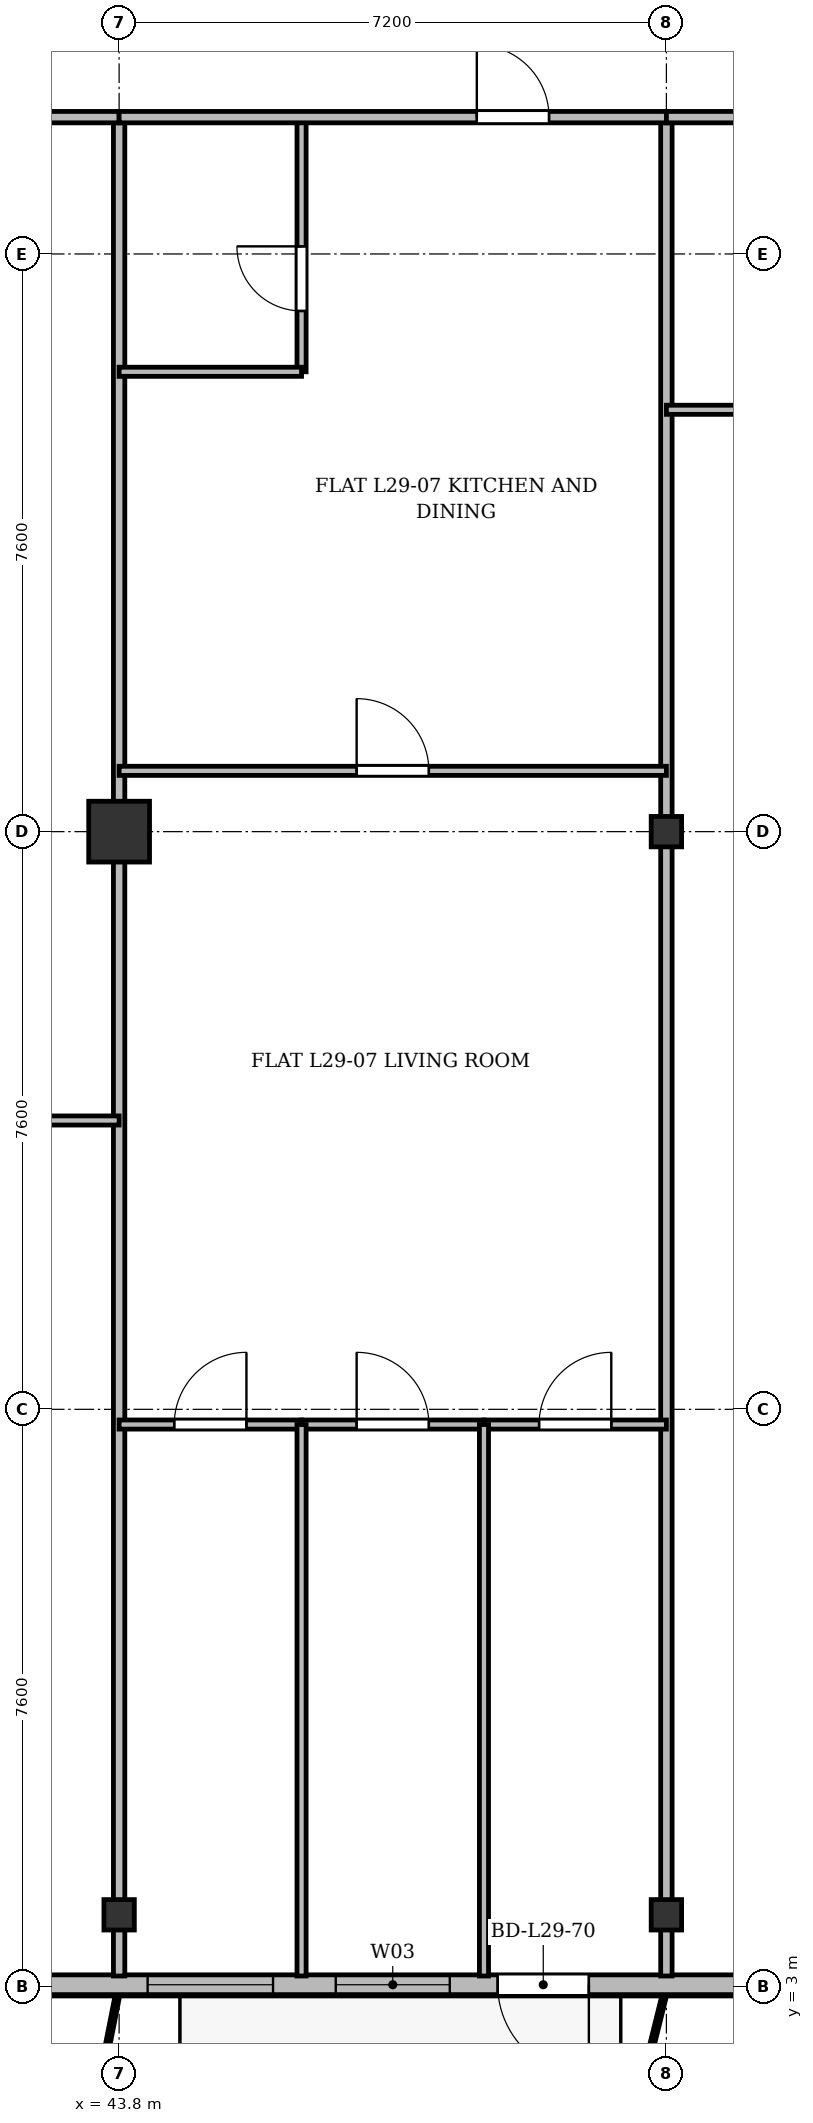
"""IFC4 building model, lengths in metres.
Left out: names, types, materials, properties, quantities, classifications, styles, units other than length and angle.
Written with IfcOpenShell. Run it as: python <this file> out.ifc"""

import sys

from ifc_helpers import new_model, si_unit, direction, frame, frame_2d, origin, origin_2d, place, context, subcontext, project, spatial, rectangle, i_section, extrude, source, transform, mapped, element, fill, save


model = new_model("IFC4")
c1 = context("Model", 3, precision=1e-05, world=origin(), true_north=direction((0.0, 1.0)))
c2 = subcontext(c1, "Body", "Model", "MODEL_VIEW")
j1 = project(units=[si_unit("LENGTHUNIT", "METRE"), si_unit("PLANEANGLEUNIT", "RADIAN")], contexts=[c1])
p1 = place(None, origin())
s1 = spatial("IfcSite", under=j1, at=p1, CompositionType="ELEMENT")
p2 = place(p1, origin())
s2 = spatial("IfcBuilding", under=s1, at=p2, CompositionType="ELEMENT")
p3 = place(p2, frame((0.0, 0.0, 114.1)))
s3 = spatial("IfcBuildingStorey", under=s2, at=p3, CompositionType="ELEMENT", Elevation=114.1)
m1 = source(origin(), c2, "Body", "SweptSolid", [
    extrude(i_section(OverallWidth=0.4, OverallDepth=0.4, WebThickness=0.022, FlangeThickness=0.035, at=origin_2d()), origin(), (0.0, 0.0, 1.0), 3.6),
])
p4 = place(p3, frame((43.8, 3.95, 0.0), z_axis=(0.0, 0.0, 1.0), x_axis=(1.0, 0.0, 0.0)))
e1 = element("IfcColumn", 1, at=p4, inside=s3, PredefinedType="COLUMN", context=c2, shape_type="MappedRepresentation", body=[
    mapped(m1, transform((0.0, 0.0, 0.0), x_axis=(1.0, 0.0, 0.0), y_axis=(0.0, 1.0, 0.0), z_axis=(0.0, 0.0, 1.0), scale=1.0)),
])
m2 = source(origin(), c2, "Body", "SweptSolid", [
    extrude(rectangle(XDim=0.8, YDim=0.8, at=origin_2d()), origin(), (0.0, 0.0, 1.0), 3.6),
])
p5 = place(p3, frame((43.8, 18.2, 0.0), z_axis=(0.0, 0.0, 1.0), x_axis=(1.0, 0.0, 0.0)))
e2 = element("IfcColumn", 2, at=p5, inside=s3, PredefinedType="COLUMN", context=c2, shape_type="MappedRepresentation", body=[
    mapped(m2, transform((0.0, 0.0, 0.0), x_axis=(1.0, 0.0, 0.0), y_axis=(0.0, 1.0, 0.0), z_axis=(0.0, 0.0, 1.0), scale=1.0)),
])
for number, where, z_axis, x_axis in (
    (3, (51.0, 3.95, 0.0), (0.0, 0.0, 1.0), (1.0, 0.0, 0.0)),
    (4, (51.0, 18.2, 0.0), (0.0, 0.0, 1.0), (1.0, 0.0, 0.0)),
):
    element("IfcColumn", number, at=place(p3, frame(where, z_axis=z_axis, x_axis=x_axis)), inside=s3, PredefinedType="COLUMN", context=c2, shape_type="MappedRepresentation", body=[
        mapped(m1, transform((0.0, 0.0, 0.0), x_axis=(1.0, 0.0, 0.0), y_axis=(0.0, 1.0, 0.0), z_axis=(0.0, 0.0, 1.0), scale=1.0)),
    ])
p6 = place(p3, frame((66.9, 3.03, 0.0), z_axis=(0.0, 0.0, 1.0), x_axis=(-1.0, 0.0, 0.0)))
e5 = element("IfcWall", 5, at=p6, inside=s3, PredefinedType="SOLIDWALL", context=c2, shape_type="SweptSolid", body=[
    extrude(rectangle(XDim=59.4, YDim=0.26, at=frame_2d((29.7, 0.0))), origin(), (0.0, 0.0, 1.0), 3.34),
])
p7 = place(p6, frame((0.47, 0.0, 0.9)))
e6 = element("IfcOpeningElement", 6, at=p7, cuts=e5, PredefinedType="OPENING", context=c2, shape_type="SweptSolid", body=[
    extrude(rectangle(XDim=1.65, YDim=1.85, at=frame_2d((0.825, 0.925))), frame((0.0, 0.14, 0.0), z_axis=(0.0, -1.0, 0.0), x_axis=(1.0, 0.0, 0.0)), (0.0, 0.0, 1.0), 0.28),
])
p8 = place(p6, frame((4.4, 0.0, 0.9)))
e7 = element("IfcOpeningElement", 7, at=p8, cuts=e5, PredefinedType="OPENING", context=c2, shape_type="SweptSolid", body=[
    extrude(rectangle(XDim=1.8, YDim=1.8, at=frame_2d((0.9, 0.9))), frame((0.0, 0.14, 0.0), z_axis=(0.0, -1.0, 0.0), x_axis=(1.0, 0.0, 0.0)), (0.0, 0.0, 1.0), 0.28),
])
p9 = place(p6, frame((10.9, 0.0, 0.9)))
e8 = element("IfcOpeningElement", 8, at=p9, cuts=e5, PredefinedType="OPENING", context=c2, shape_type="SweptSolid", body=[
    extrude(rectangle(XDim=2.2, YDim=1.8, at=frame_2d((1.1, 0.9))), frame((0.0, 0.14, 0.0), z_axis=(0.0, -1.0, 0.0), x_axis=(1.0, 0.0, 0.0)), (0.0, 0.0, 1.0), 0.28),
])
p10 = place(p6, frame((16.92, 0.0, 0.0)))
e9 = element("IfcOpeningElement", 9, at=p10, cuts=e5, PredefinedType="OPENING", context=c2, shape_type="SweptSolid", body=[
    extrude(rectangle(XDim=1.2, YDim=2.2, at=frame_2d((0.6, 1.1))), frame((0.0, 0.14, 0.0), z_axis=(0.0, -1.0, 0.0), x_axis=(1.0, 0.0, 0.0)), (0.0, 0.0, 1.0), 0.28),
])
p11 = place(p6, frame((18.75, 0.0, 0.9)))
e10 = element("IfcOpeningElement", 10, at=p11, cuts=e5, PredefinedType="OPENING", context=c2, shape_type="SweptSolid", body=[
    extrude(rectangle(XDim=1.5, YDim=1.75, at=frame_2d((0.75, 0.875))), frame((0.0, 0.14, 0.0), z_axis=(0.0, -1.0, 0.0), x_axis=(1.0, 0.0, 0.0)), (0.0, 0.0, 1.0), 0.28),
])
p12 = place(p6, frame((21.075, 0.0, 0.9)))
e11 = element("IfcOpeningElement", 11, at=p12, cuts=e5, PredefinedType="OPENING", context=c2, shape_type="SweptSolid", body=[
    extrude(rectangle(XDim=1.65, YDim=1.85, at=frame_2d((0.825, 0.925))), frame((0.0, 0.14, 0.0), z_axis=(0.0, -1.0, 0.0), x_axis=(1.0, 0.0, 0.0)), (0.0, 0.0, 1.0), 0.28),
])
p13 = place(p6, frame((26.5, 0.0, 0.9)))
e12 = element("IfcOpeningElement", 12, at=p13, cuts=e5, PredefinedType="OPENING", context=c2, shape_type="SweptSolid", body=[
    extrude(rectangle(XDim=1.8, YDim=1.8, at=frame_2d((0.9, 0.9))), frame((0.0, 0.14, 0.0), z_axis=(0.0, -1.0, 0.0), x_axis=(1.0, 0.0, 0.0)), (0.0, 0.0, 1.0), 0.28),
])
p14 = place(p6, frame((32.45, 0.0, 0.9)))
e13 = element("IfcOpeningElement", 13, at=p14, cuts=e5, PredefinedType="OPENING", context=c2, shape_type="SweptSolid", body=[
    extrude(rectangle(XDim=2.2, YDim=1.8, at=frame_2d((1.1, 0.9))), frame((0.0, 0.14, 0.0), z_axis=(0.0, -1.0, 0.0), x_axis=(1.0, 0.0, 0.0)), (0.0, 0.0, 1.0), 0.28),
])
p15 = place(p6, frame((36.5, 0.0, 0.9)))
e14 = element("IfcOpeningElement", 14, at=p15, cuts=e5, PredefinedType="OPENING", context=c2, shape_type="SweptSolid", body=[
    extrude(rectangle(XDim=1.5, YDim=1.75, at=frame_2d((0.75, 0.875))), frame((0.0, 0.14, 0.0), z_axis=(0.0, -1.0, 0.0), x_axis=(1.0, 0.0, 0.0)), (0.0, 0.0, 1.0), 0.28),
])
p16 = place(p6, frame((39.6, 0.0, 0.9)))
e15 = element("IfcOpeningElement", 15, at=p16, cuts=e5, PredefinedType="OPENING", context=c2, shape_type="SweptSolid", body=[
    extrude(rectangle(XDim=2.0, YDim=1.95, at=frame_2d((1.0, 0.975))), frame((0.0, 0.14, 0.0), z_axis=(0.0, -1.0, 0.0), x_axis=(1.0, 0.0, 0.0)), (0.0, 0.0, 1.0), 0.28),
])
p17 = place(p6, frame((42.775, 0.0, 0.9)))
e16 = element("IfcOpeningElement", 16, at=p17, cuts=e5, PredefinedType="OPENING", context=c2, shape_type="SweptSolid", body=[
    extrude(rectangle(XDim=1.65, YDim=1.85, at=frame_2d((0.825, 0.925))), frame((0.0, 0.14, 0.0), z_axis=(0.0, -1.0, 0.0), x_axis=(1.0, 0.0, 0.0)), (0.0, 0.0, 1.0), 0.28),
])
p18 = place(p6, frame((46.435, 0.0, 0.0)))
e17 = element("IfcOpeningElement", 17, at=p18, cuts=e5, PredefinedType="OPENING", context=c2, shape_type="SweptSolid", body=[
    extrude(rectangle(XDim=1.2, YDim=2.2, at=frame_2d((0.6, 1.1))), frame((0.0, 0.14, 0.0), z_axis=(0.0, -1.0, 0.0), x_axis=(1.0, 0.0, 0.0)), (0.0, 0.0, 1.0), 0.28),
])
p19 = place(p6, frame((48.65, 0.0, 0.9)))
e18 = element("IfcOpeningElement", 18, at=p19, cuts=e5, PredefinedType="OPENING", context=c2, shape_type="SweptSolid", body=[
    extrude(rectangle(XDim=2.2, YDim=1.8, at=frame_2d((1.1, 0.9))), frame((0.0, 0.14, 0.0), z_axis=(0.0, -1.0, 0.0), x_axis=(1.0, 0.0, 0.0)), (0.0, 0.0, 1.0), 0.28),
])
p20 = place(p6, frame((53.25, 0.0, 0.9)))
e19 = element("IfcOpeningElement", 19, at=p20, cuts=e5, PredefinedType="OPENING", context=c2, shape_type="SweptSolid", body=[
    extrude(rectangle(XDim=1.5, YDim=1.75, at=frame_2d((0.75, 0.875))), frame((0.0, 0.14, 0.0), z_axis=(0.0, -1.0, 0.0), x_axis=(1.0, 0.0, 0.0)), (0.0, 0.0, 1.0), 0.28),
])
p21 = place(p6, frame((57.005, 0.0, 0.9)))
e20 = element("IfcOpeningElement", 20, at=p21, cuts=e5, PredefinedType="OPENING", context=c2, shape_type="SweptSolid", body=[
    extrude(rectangle(XDim=2.0, YDim=1.95, at=frame_2d((1.0, 0.975))), frame((0.0, 0.14, 0.0), z_axis=(0.0, -1.0, 0.0), x_axis=(1.0, 0.0, 0.0)), (0.0, 0.0, 1.0), 0.28),
])
for number, where, z_axis, x_axis in (
    (21, (43.8, 3.145, 0.0), (0.0, 0.0, 1.0), (0.0, 1.0, 0.0)),
    (22, (51.0, 3.145, 0.0), (0.0, 0.0, 1.0), (0.0, 1.0, 0.0)),
):
    element("IfcWall", number, at=place(p3, frame(where, z_axis=z_axis, x_axis=x_axis)), inside=s3, PredefinedType="PARTITIONING", context=c2, shape_type="SweptSolid", body=[
        extrude(rectangle(XDim=24.455, YDim=0.15, at=frame_2d((12.228, 0.0))), origin(), (0.0, 0.0, 1.0), 2.84),
    ])
p22 = place(p3, frame((35.2, 27.6, 0.0), z_axis=(0.0, 0.0, 1.0), x_axis=(1.0, 0.0, 0.0)))
e23 = element("IfcWall", 23, at=p22, inside=s3, PredefinedType="PARTITIONING", context=c2, shape_type="SweptSolid", body=[
    extrude(rectangle(XDim=8.6, YDim=0.15, at=frame_2d((4.3, 0.0))), origin(), (0.0, 0.0, 1.0), 2.84),
])
p23 = place(p22, frame((3.825, 0.0, 0.0)))
e24 = element("IfcOpeningElement", 24, at=p23, cuts=e23, PredefinedType="OPENING", context=c2, shape_type="SweptSolid", body=[
    extrude(rectangle(XDim=0.95, YDim=2.15, at=frame_2d((0.475, 1.075))), frame((0.0, 0.085, 0.0), z_axis=(0.0, -1.0, 0.0), x_axis=(1.0, 0.0, 0.0)), (0.0, 0.0, 1.0), 0.17),
])
p24 = place(p3, frame((35.2, 14.4, 0.0), z_axis=(0.0, 0.0, 1.0), x_axis=(1.0, 0.0, 0.0)))
e25 = element("IfcWall", 25, at=p24, inside=s3, PredefinedType="PARTITIONING", context=c2, shape_type="SweptSolid", body=[
    extrude(rectangle(XDim=8.6, YDim=0.12, at=frame_2d((4.3, 0.0))), origin(), (0.0, 0.0, 1.0), 2.84),
])
p25 = place(p24, frame((3.825, 0.0, 0.0)))
e26 = element("IfcOpeningElement", 26, at=p25, cuts=e25, PredefinedType="OPENING", context=c2, shape_type="SweptSolid", body=[
    extrude(rectangle(XDim=0.95, YDim=2.15, at=frame_2d((0.475, 1.075))), frame((0.0, 0.07, 0.0), z_axis=(0.0, -1.0, 0.0), x_axis=(1.0, 0.0, 0.0)), (0.0, 0.0, 1.0), 0.14),
])
p26 = place(p3, frame((43.8, 19.0, 0.0), z_axis=(0.0, 0.0, 1.0), x_axis=(1.0, 0.0, 0.0)))
e27 = element("IfcWall", 27, at=p26, inside=s3, PredefinedType="PARTITIONING", context=c2, shape_type="SweptSolid", body=[
    extrude(rectangle(XDim=7.2, YDim=0.12, at=frame_2d((3.6, 0.0))), origin(), (0.0, 0.0, 1.0), 2.84),
])
p27 = place(p26, frame((3.125, 0.0, 0.0)))
e28 = element("IfcOpeningElement", 28, at=p27, cuts=e27, PredefinedType="OPENING", context=c2, shape_type="SweptSolid", body=[
    extrude(rectangle(XDim=0.95, YDim=2.15, at=frame_2d((0.475, 1.075))), frame((0.0, 0.07, 0.0), z_axis=(0.0, -1.0, 0.0), x_axis=(1.0, 0.0, 0.0)), (0.0, 0.0, 1.0), 0.14),
])
p28 = place(p3, frame((46.2, 24.25, 0.0), z_axis=(0.0, 0.0, 1.0), x_axis=(0.0, 1.0, 0.0)))
e29 = element("IfcWall", 29, at=p28, inside=s3, PredefinedType="PARTITIONING", context=c2, shape_type="SweptSolid", body=[
    extrude(rectangle(XDim=3.35, YDim=0.12, at=frame_2d((1.675, 0.0))), origin(), (0.0, 0.0, 1.0), 2.99),
])
p29 = place(p28, frame((0.8, 0.0, 0.0)))
e30 = element("IfcOpeningElement", 30, at=p29, cuts=e29, PredefinedType="OPENING", context=c2, shape_type="SweptSolid", body=[
    extrude(rectangle(XDim=0.85, YDim=2.1, at=frame_2d((0.425, 1.05))), frame((0.0, 0.07, 0.0), z_axis=(0.0, -1.0, 0.0), x_axis=(1.0, 0.0, 0.0)), (0.0, 0.0, 1.0), 0.14),
])
p30 = place(p3, frame((43.8, 24.25, 0.0), z_axis=(0.0, 0.0, 1.0), x_axis=(1.0, 0.0, 0.0)))
e31 = element("IfcWall", 31, at=p30, inside=s3, PredefinedType="PARTITIONING", context=c2, shape_type="SweptSolid", body=[
    extrude(rectangle(XDim=2.4, YDim=0.12, at=frame_2d((1.2, 0.0))), origin(), (0.0, 0.0, 1.0), 2.84),
])
p31 = place(p3, frame((43.8, 27.6, 0.0), z_axis=(0.0, 0.0, 1.0), x_axis=(1.0, 0.0, 0.0)))
e32 = element("IfcWall", 32, at=p31, inside=s3, PredefinedType="PARTITIONING", context=c2, shape_type="SweptSolid", body=[
    extrude(rectangle(XDim=7.2, YDim=0.15, at=frame_2d((3.6, 0.0))), origin(), (0.0, 0.0, 1.0), 2.84),
])
p32 = place(p31, frame((4.706, 0.0, 0.0)))
e33 = element("IfcOpeningElement", 33, at=p32, cuts=e32, PredefinedType="OPENING", context=c2, shape_type="SweptSolid", body=[
    extrude(rectangle(XDim=0.95, YDim=2.15, at=frame_2d((0.475, 1.075))), frame((0.0, 0.085, 0.0), z_axis=(0.0, -1.0, 0.0), x_axis=(1.0, 0.0, 0.0)), (0.0, 0.0, 1.0), 0.17),
])
p33 = place(p3, frame((43.8, 10.4, 0.0), z_axis=(0.0, 0.0, 1.0), x_axis=(1.0, 0.0, 0.0)))
e34 = element("IfcWall", 34, at=p33, inside=s3, PredefinedType="PARTITIONING", context=c2, shape_type="SweptSolid", body=[
    extrude(rectangle(XDim=2.4, YDim=0.12, at=frame_2d((1.2, 0.0))), origin(), (0.0, 0.0, 1.0), 2.84),
])
p34 = place(p33, frame((0.725, 0.0, 0.0)))
e35 = element("IfcOpeningElement", 35, at=p34, cuts=e34, PredefinedType="OPENING", context=c2, shape_type="SweptSolid", body=[
    extrude(rectangle(XDim=0.95, YDim=2.15, at=frame_2d((0.475, 1.075))), frame((0.0, 0.07, 0.0), z_axis=(0.0, -1.0, 0.0), x_axis=(1.0, 0.0, 0.0)), (0.0, 0.0, 1.0), 0.14),
])
p35 = place(p3, frame((46.2, 10.4, 0.0), z_axis=(0.0, 0.0, 1.0), x_axis=(1.0, 0.0, 0.0)))
e36 = element("IfcWall", 36, at=p35, inside=s3, PredefinedType="PARTITIONING", context=c2, shape_type="SweptSolid", body=[
    extrude(rectangle(XDim=2.4, YDim=0.12, at=frame_2d((1.2, 0.0))), origin(), (0.0, 0.0, 1.0), 3.34),
])
p36 = place(p35, frame((0.725, 0.0, 0.0)))
e37 = element("IfcOpeningElement", 37, at=p36, cuts=e36, PredefinedType="OPENING", context=c2, shape_type="SweptSolid", body=[
    extrude(rectangle(XDim=0.95, YDim=2.15, at=frame_2d((0.475, 1.075))), frame((0.0, 0.07, 0.0), z_axis=(0.0, -1.0, 0.0), x_axis=(1.0, 0.0, 0.0)), (0.0, 0.0, 1.0), 0.14),
])
p37 = place(p3, frame((46.2, 3.145, 0.0), z_axis=(0.0, 0.0, 1.0), x_axis=(0.0, 1.0, 0.0)))
e38 = element("IfcWall", 38, at=p37, inside=s3, PredefinedType="PARTITIONING", context=c2, shape_type="SweptSolid", body=[
    extrude(rectangle(XDim=7.255, YDim=0.12, at=frame_2d((3.627, 0.0))), origin(), (0.0, 0.0, 1.0), 2.752),
])
p38 = place(p3, frame((48.6, 10.4, 0.0), z_axis=(0.0, 0.0, 1.0), x_axis=(1.0, 0.0, 0.0)))
e39 = element("IfcWall", 39, at=p38, inside=s3, PredefinedType="PARTITIONING", context=c2, shape_type="SweptSolid", body=[
    extrude(rectangle(XDim=2.4, YDim=0.12, at=frame_2d((1.2, 0.0))), origin(), (0.0, 0.0, 1.0), 2.84),
])
p39 = place(p38, frame((0.725, 0.0, 0.0)))
e40 = element("IfcOpeningElement", 40, at=p39, cuts=e39, PredefinedType="OPENING", context=c2, shape_type="SweptSolid", body=[
    extrude(rectangle(XDim=0.95, YDim=2.15, at=frame_2d((0.475, 1.075))), frame((0.0, 0.07, 0.0), z_axis=(0.0, -1.0, 0.0), x_axis=(1.0, 0.0, 0.0)), (0.0, 0.0, 1.0), 0.14),
])
p40 = place(p3, frame((48.6, 3.145, 0.0), z_axis=(0.0, 0.0, 1.0), x_axis=(0.0, 1.0, 0.0)))
e41 = element("IfcWall", 41, at=p40, inside=s3, PredefinedType="PARTITIONING", context=c2, shape_type="SweptSolid", body=[
    extrude(rectangle(XDim=7.255, YDim=0.12, at=frame_2d((3.627, 0.0))), origin(), (0.0, 0.0, 1.0), 2.752),
])
p41 = place(p3, frame((51.0, 27.6, 0.0), z_axis=(0.0, 0.0, 1.0), x_axis=(1.0, 0.0, 0.0)))
e42 = element("IfcWall", 42, at=p41, inside=s3, PredefinedType="PARTITIONING", context=c2, shape_type="SweptSolid", body=[
    extrude(rectangle(XDim=7.8, YDim=0.15, at=frame_2d((3.9, 0.0))), origin(), (0.0, 0.0, 1.0), 2.84),
])
p42 = place(p41, frame((3.333, 0.0, 0.0)))
e43 = element("IfcOpeningElement", 43, at=p42, cuts=e42, PredefinedType="OPENING", context=c2, shape_type="SweptSolid", body=[
    extrude(rectangle(XDim=0.95, YDim=2.15, at=frame_2d((0.475, 1.075))), frame((0.0, 0.085, 0.0), z_axis=(0.0, -1.0, 0.0), x_axis=(1.0, 0.0, 0.0)), (0.0, 0.0, 1.0), 0.17),
])
p43 = place(p3, frame((51.0, 23.75, 0.0), z_axis=(0.0, 0.0, 1.0), x_axis=(1.0, 0.0, 0.0)))
e44 = element("IfcWall", 44, at=p43, inside=s3, PredefinedType="PARTITIONING", context=c2, shape_type="SweptSolid", body=[
    extrude(rectangle(XDim=7.8, YDim=0.12, at=frame_2d((3.9, 0.0))), origin(), (0.0, 0.0, 1.0), 2.84),
])
p44 = place(p43, frame((3.333, 0.0, 0.0)))
e45 = element("IfcOpeningElement", 45, at=p44, cuts=e44, PredefinedType="OPENING", context=c2, shape_type="SweptSolid", body=[
    extrude(rectangle(XDim=0.95, YDim=2.15, at=frame_2d((0.475, 1.075))), frame((0.0, 0.07, 0.0), z_axis=(0.0, -1.0, 0.0), x_axis=(1.0, 0.0, 0.0)), (0.0, 0.0, 1.0), 0.14),
])
m3 = source(origin(), c2, "Body", "SweptSolid", [
    extrude(rectangle(XDim=1.2, YDim=2.2, at=frame_2d((0.6, 1.1))), frame((0.0, 0.025, 0.0), z_axis=(0.0, -1.0, 0.0), x_axis=(1.0, 0.0, 0.0)), (0.0, 0.0, 1.0), 0.05),
])
p45 = place(p10, origin())
e46 = element("IfcDoor", 46, at=p45, inside=s3, OperationType="SINGLE_SWING_LEFT", PredefinedType="DOOR", context=c2, shape_type="MappedRepresentation", body=[
    mapped(m3, transform((0.0, 0.0, 0.0), x_axis=(1.0, 0.0, 0.0), y_axis=(0.0, 1.0, 0.0), z_axis=(0.0, 0.0, 1.0), scale=1.0)),
])
fill(e9, e46)
m4 = source(origin(), c2, "Body", "SweptSolid", [
    extrude(rectangle(XDim=1.5, YDim=1.75, at=frame_2d((0.75, 0.875))), frame((0.0, 0.03, 0.0), z_axis=(0.0, -1.0, 0.0), x_axis=(1.0, 0.0, 0.0)), (0.0, 0.0, 1.0), 0.06),
])
p46 = place(p11, origin())
e47 = element("IfcWindow", 47, at=p46, inside=s3, PartitioningType="SINGLE_PANEL", PredefinedType="WINDOW", context=c2, shape_type="MappedRepresentation", body=[
    mapped(m4, transform((0.0, 0.0, 0.0), x_axis=(1.0, 0.0, 0.0), y_axis=(0.0, 1.0, 0.0), z_axis=(0.0, 0.0, 1.0), scale=1.0)),
])
fill(e10, e47)
m5 = source(origin(), c2, "Body", "SweptSolid", [
    extrude(rectangle(XDim=1.65, YDim=1.85, at=frame_2d((0.825, 0.925))), frame((0.0, 0.03, 0.0), z_axis=(0.0, -1.0, 0.0), x_axis=(1.0, 0.0, 0.0)), (0.0, 0.0, 1.0), 0.06),
])
p47 = place(p12, origin())
e48 = element("IfcWindow", 48, at=p47, inside=s3, PartitioningType="SINGLE_PANEL", PredefinedType="WINDOW", context=c2, shape_type="MappedRepresentation", body=[
    mapped(m5, transform((0.0, 0.0, 0.0), x_axis=(1.0, 0.0, 0.0), y_axis=(0.0, 1.0, 0.0), z_axis=(0.0, 0.0, 1.0), scale=1.0)),
])
fill(e11, e48)
m6 = source(origin(), c2, "Body", "SweptSolid", [
    extrude(rectangle(XDim=0.95, YDim=2.15, at=frame_2d((0.475, 1.075))), frame((0.0, 0.025, 0.0), z_axis=(0.0, -1.0, 0.0), x_axis=(1.0, 0.0, 0.0)), (0.0, 0.0, 1.0), 0.05),
])
p48 = place(p27, origin())
e49 = element("IfcDoor", 49, at=p48, inside=s3, OperationType="SINGLE_SWING_LEFT", PredefinedType="DOOR", context=c2, shape_type="MappedRepresentation", body=[
    mapped(m6, transform((0.0, 0.0, 0.0), x_axis=(1.0, 0.0, 0.0), y_axis=(0.0, 1.0, 0.0), z_axis=(0.0, 0.0, 1.0), scale=1.0)),
])
fill(e28, e49)
m7 = source(origin(), c2, "Body", "SweptSolid", [
    extrude(rectangle(XDim=0.85, YDim=2.1, at=frame_2d((0.425, 1.05))), frame((0.0, 0.025, 0.0), z_axis=(0.0, -1.0, 0.0), x_axis=(1.0, 0.0, 0.0)), (0.0, 0.0, 1.0), 0.05),
])
p49 = place(p29, origin())
e50 = element("IfcDoor", 50, at=p49, inside=s3, OperationType="SINGLE_SWING_RIGHT", PredefinedType="DOOR", context=c2, shape_type="MappedRepresentation", body=[
    mapped(m7, transform((0.0, 0.0, 0.0), x_axis=(1.0, 0.0, 0.0), y_axis=(0.0, 1.0, 0.0), z_axis=(0.0, 0.0, 1.0), scale=1.0)),
])
fill(e30, e50)
p50 = place(p32, origin())
e51 = element("IfcDoor", 51, at=p50, inside=s3, OperationType="SINGLE_SWING_LEFT", PredefinedType="DOOR", context=c2, shape_type="MappedRepresentation", body=[
    mapped(m6, transform((0.0, 0.0, 0.0), x_axis=(1.0, 0.0, 0.0), y_axis=(0.0, 1.0, 0.0), z_axis=(0.0, 0.0, 1.0), scale=1.0)),
])
fill(e33, e51)
p51 = place(p34, origin())
e52 = element("IfcDoor", 52, at=p51, inside=s3, OperationType="SINGLE_SWING_RIGHT", PredefinedType="DOOR", context=c2, shape_type="MappedRepresentation", body=[
    mapped(m6, transform((0.0, 0.0, 0.0), x_axis=(1.0, 0.0, 0.0), y_axis=(0.0, 1.0, 0.0), z_axis=(0.0, 0.0, 1.0), scale=1.0)),
])
fill(e35, e52)
p52 = place(p36, origin())
e53 = element("IfcDoor", 53, at=p52, inside=s3, OperationType="SINGLE_SWING_LEFT", PredefinedType="DOOR", context=c2, shape_type="MappedRepresentation", body=[
    mapped(m6, transform((0.0, 0.0, 0.0), x_axis=(1.0, 0.0, 0.0), y_axis=(0.0, 1.0, 0.0), z_axis=(0.0, 0.0, 1.0), scale=1.0)),
])
fill(e37, e53)
p53 = place(p39, origin())
e54 = element("IfcDoor", 54, at=p53, inside=s3, OperationType="SINGLE_SWING_RIGHT", PredefinedType="DOOR", context=c2, shape_type="MappedRepresentation", body=[
    mapped(m6, transform((0.0, 0.0, 0.0), x_axis=(1.0, 0.0, 0.0), y_axis=(0.0, 1.0, 0.0), z_axis=(0.0, 0.0, 1.0), scale=1.0)),
])
fill(e40, e54)
save(model, sys.argv[1])
